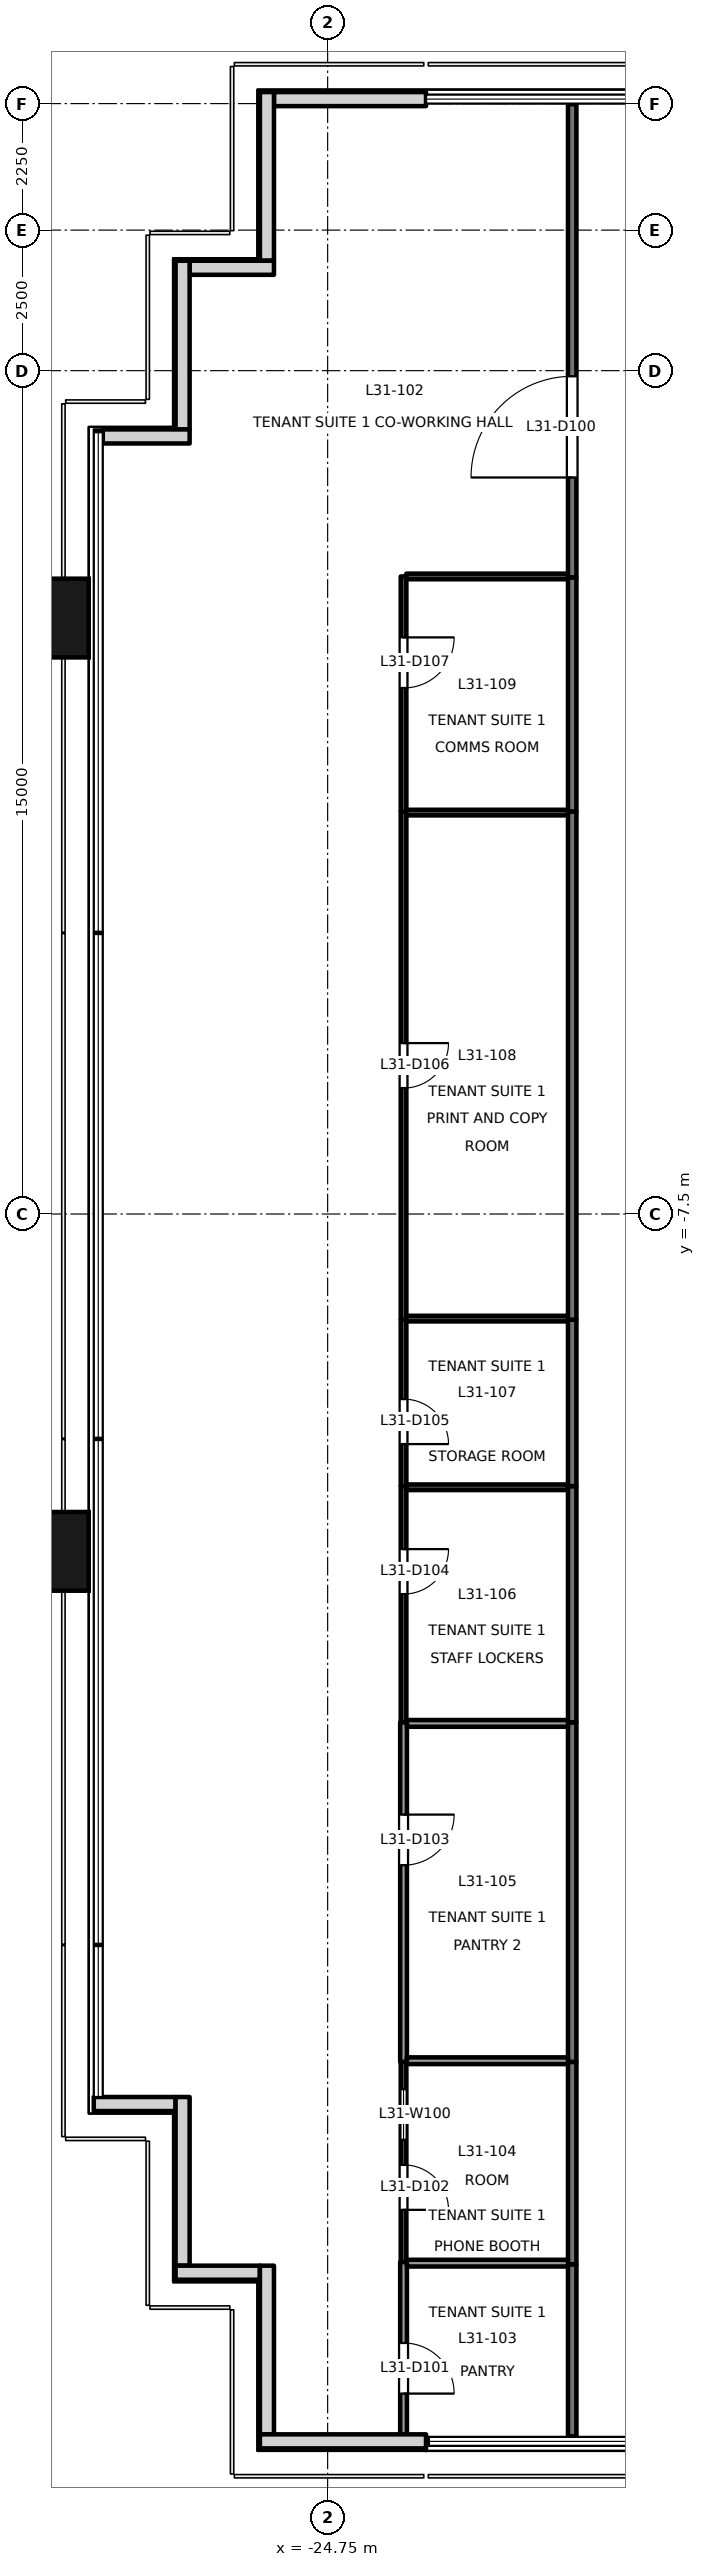
"""IFC4 building model, lengths in metres.
Left out: names, types, materials, properties, quantities, classifications, styles, units other than length and angle.
Written with IfcOpenShell. Run it as: python <this file> out.ifc"""

import sys

from ifc_helpers import new_model, si_unit, direction, frame, frame_2d, origin, origin_2d, place, context, subcontext, project, spatial, rectangle, extrude, element, fill, save


model = new_model("IFC4")
c1 = context("Model", 3, precision=1e-05, world=origin(), true_north=direction((0.0, 1.0)))
c2 = subcontext(c1, "Body", "Model", "MODEL_VIEW")
j1 = project(units=[si_unit("LENGTHUNIT", "METRE"), si_unit("PLANEANGLEUNIT", "RADIAN")], contexts=[c1])
p1 = place(None, origin())
s1 = spatial("IfcSite", under=j1, at=p1, CompositionType="ELEMENT")
p2 = place(p1, origin())
s2 = spatial("IfcBuilding", under=s1, at=p2, CompositionType="ELEMENT")
p3 = place(p2, frame((0.0, 0.0, 138.1)))
s3 = spatial("IfcBuildingStorey", under=s2, at=p3, CompositionType="ELEMENT", Elevation=138.1)
for number, where, z_axis, x_axis in (
    (1, (-29.9, -13.5, -0.2), (0.0, 0.0, 1.0), (0.0, 1.0, 0.0)),
    (2, (-29.9, 3.1, -0.2), (0.0, 0.0, 1.0), (0.0, 1.0, 0.0)),
):
    element("IfcColumn", number, at=place(p3, frame(where, z_axis=z_axis, x_axis=x_axis)), inside=s3, PredefinedType="COLUMN", context=c2, shape_type="SweptSolid", body=[
        extrude(rectangle(XDim=1.4, YDim=1.8, at=origin_2d()), origin(), (0.0, 0.0, 1.0), 4.0),
    ])
p4 = place(p3, frame((-23.0, 12.33, 0.0), z_axis=(0.0, 0.0, 1.0), x_axis=(-1.0, 0.0, 0.0)))
e3 = element("IfcWall", 3, at=p4, inside=s3, PredefinedType="SOLIDWALL", context=c2, shape_type="SweptSolid", body=[
    extrude(rectangle(XDim=2.705, YDim=0.25, at=frame_2d((1.353, 0.0))), origin(), (0.0, 0.0, 1.0), 3.8),
])
p5 = place(p3, frame((-25.83, 12.455, 0.0), z_axis=(0.0, 0.0, 1.0), x_axis=(0.0, -1.0, 0.0)))
e4 = element("IfcWall", 4, at=p5, inside=s3, PredefinedType="SOLIDWALL", context=c2, shape_type="SweptSolid", body=[
    extrude(rectangle(XDim=3.0, YDim=0.25, at=frame_2d((1.5, 0.0))), origin(), (0.0, 0.0, 1.0), 3.8),
])
p6 = place(p3, frame((-25.705, 9.33, 0.0), z_axis=(0.0, 0.0, 1.0), x_axis=(-1.0, 0.0, 0.0)))
e5 = element("IfcWall", 5, at=p6, inside=s3, PredefinedType="SOLIDWALL", context=c2, shape_type="SweptSolid", body=[
    extrude(rectangle(XDim=1.5, YDim=0.25, at=frame_2d((0.75, 0.0))), origin(), (0.0, 0.0, 1.0), 3.8),
])
p7 = place(p3, frame((-27.33, 9.455, 0.0), z_axis=(0.0, 0.0, 1.0), x_axis=(0.0, -1.0, 0.0)))
e6 = element("IfcWall", 6, at=p7, inside=s3, PredefinedType="SOLIDWALL", context=c2, shape_type="SweptSolid", body=[
    extrude(rectangle(XDim=3.0, YDim=0.25, at=frame_2d((1.5, 0.0))), origin(), (0.0, 0.0, 1.0), 3.8),
])
p8 = place(p3, frame((-27.205, 6.33, 0.0), z_axis=(0.0, 0.0, 1.0), x_axis=(-1.0, 0.0, 0.0)))
e7 = element("IfcWall", 7, at=p8, inside=s3, PredefinedType="SOLIDWALL", context=c2, shape_type="SweptSolid", body=[
    extrude(rectangle(XDim=1.545, YDim=0.25, at=frame_2d((0.772, 0.0))), origin(), (0.0, 0.0, 1.0), 3.8),
])
p9 = place(p3, frame((-28.91, -23.33, 0.0), z_axis=(0.0, 0.0, 1.0), x_axis=(1.0, 0.0, 0.0)))
e8 = element("IfcWall", 8, at=p9, inside=s3, PredefinedType="SOLIDWALL", context=c2, shape_type="SweptSolid", body=[
    extrude(rectangle(XDim=1.455, YDim=0.25, at=frame_2d((0.728, 0.0))), origin(), (0.0, 0.0, 1.0), 3.8),
])
p10 = place(p3, frame((-27.33, -23.205, 0.0), z_axis=(0.0, 0.0, 1.0), x_axis=(0.0, -1.0, 0.0)))
e9 = element("IfcWall", 9, at=p10, inside=s3, PredefinedType="SOLIDWALL", context=c2, shape_type="SweptSolid", body=[
    extrude(rectangle(XDim=3.0, YDim=0.25, at=frame_2d((1.5, 0.0))), origin(), (0.0, 0.0, 1.0), 3.8),
])
p11 = place(p3, frame((-27.455, -26.33, 0.0), z_axis=(0.0, 0.0, 1.0), x_axis=(1.0, 0.0, 0.0)))
e10 = element("IfcWall", 10, at=p11, inside=s3, PredefinedType="SOLIDWALL", context=c2, shape_type="SweptSolid", body=[
    extrude(rectangle(XDim=1.5, YDim=0.25, at=frame_2d((0.75, 0.0))), origin(), (0.0, 0.0, 1.0), 3.8),
])
p12 = place(p3, frame((-25.83, -26.205, 0.0), z_axis=(0.0, 0.0, 1.0), x_axis=(0.0, -1.0, 0.0)))
e11 = element("IfcWall", 11, at=p12, inside=s3, PredefinedType="SOLIDWALL", context=c2, shape_type="SweptSolid", body=[
    extrude(rectangle(XDim=3.0, YDim=0.25, at=frame_2d((1.5, 0.0))), origin(), (0.0, 0.0, 1.0), 3.8),
])
p13 = place(p3, frame((-25.955, -29.33, 0.0), z_axis=(0.0, 0.0, 1.0), x_axis=(1.0, 0.0, 0.0)))
e12 = element("IfcWall", 12, at=p13, inside=s3, PredefinedType="SOLIDWALL", context=c2, shape_type="SweptSolid", body=[
    extrude(rectangle(XDim=2.955, YDim=0.25, at=frame_2d((1.478, 0.0))), origin(), (0.0, 0.0, 1.0), 3.8),
])
p14 = place(p3, frame((-20.4, 3.82, 0.0), z_axis=(0.0, 0.0, 1.0), x_axis=(0.0, 1.0, 0.0)))
e13 = element("IfcWall", 13, at=p14, inside=s3, PredefinedType="PARTITIONING", context=c2, shape_type="SweptSolid", body=[
    extrude(rectangle(XDim=8.42, YDim=0.15, at=frame_2d((4.21, 0.0))), origin(), (0.0, 0.0, 1.0), 3.3),
])
p15 = place(p14, frame((1.78, 0.0, 0.0)))
e14 = element("IfcOpeningElement", 14, at=p15, cuts=e13, PredefinedType="OPENING", context=c2, shape_type="SweptSolid", body=[
    extrude(rectangle(XDim=1.8, YDim=2.1, at=frame_2d((0.9, 1.05))), frame((0.0, 0.085, 0.0), z_axis=(0.0, -1.0, 0.0), x_axis=(1.0, 0.0, 0.0)), (0.0, 0.0, 1.0), 0.171),
])
p16 = place(p3, frame((-20.4, -29.24, 0.0), z_axis=(0.0, 0.0, 1.0), x_axis=(0.0, 1.0, 0.0)))
e15 = element("IfcWall", 15, at=p16, inside=s3, PredefinedType="PARTITIONING", context=c2, shape_type="SweptSolid", body=[
    extrude(rectangle(XDim=3.06, YDim=0.15, at=frame_2d((1.53, 0.0))), origin(), (0.0, 0.0, 1.0), 3.8),
])
p17 = place(p3, frame((-20.4, -26.18, 0.0), z_axis=(0.0, 0.0, 1.0), x_axis=(0.0, 1.0, 0.0)))
e16 = element("IfcWall", 16, at=p17, inside=s3, PredefinedType="PARTITIONING", context=c2, shape_type="SweptSolid", body=[
    extrude(rectangle(XDim=3.6, YDim=0.15, at=frame_2d((1.8, 0.0))), origin(), (0.0, 0.0, 1.0), 3.8),
])
p18 = place(p3, frame((-20.4, -22.58, 0.0), z_axis=(0.0, 0.0, 1.0), x_axis=(0.0, 1.0, 0.0)))
e17 = element("IfcWall", 17, at=p18, inside=s3, PredefinedType="PARTITIONING", context=c2, shape_type="SweptSolid", body=[
    extrude(rectangle(XDim=6.04, YDim=0.15, at=frame_2d((3.02, 0.0))), origin(), (0.0, 0.0, 1.0), 3.8),
])
p19 = place(p3, frame((-20.4, -16.54, 0.0), z_axis=(0.0, 0.0, 1.0), x_axis=(0.0, 1.0, 0.0)))
e18 = element("IfcWall", 18, at=p19, inside=s3, PredefinedType="PARTITIONING", context=c2, shape_type="SweptSolid", body=[
    extrude(rectangle(XDim=4.2, YDim=0.15, at=frame_2d((2.1, 0.0))), origin(), (0.0, 0.0, 1.0), 3.8),
])
p20 = place(p3, frame((-20.4, -12.34, 0.0), z_axis=(0.0, 0.0, 1.0), x_axis=(0.0, 1.0, 0.0)))
e19 = element("IfcWall", 19, at=p20, inside=s3, PredefinedType="PARTITIONING", context=c2, shape_type="SweptSolid", body=[
    extrude(rectangle(XDim=2.96, YDim=0.15, at=frame_2d((1.48, 0.0))), origin(), (0.0, 0.0, 1.0), 3.8),
])
p21 = place(p3, frame((-20.4, -9.38, 0.0), z_axis=(0.0, 0.0, 1.0), x_axis=(0.0, 1.0, 0.0)))
e20 = element("IfcWall", 20, at=p21, inside=s3, PredefinedType="PARTITIONING", context=c2, shape_type="SweptSolid", body=[
    extrude(rectangle(XDim=9.04, YDim=0.15, at=frame_2d((4.52, 0.0))), origin(), (0.0, 0.0, 1.0), 3.3),
])
p22 = place(p3, frame((-20.4, -0.34, 0.0), z_axis=(0.0, 0.0, 1.0), x_axis=(0.0, 1.0, 0.0)))
e21 = element("IfcWall", 21, at=p22, inside=s3, PredefinedType="PARTITIONING", context=c2, shape_type="SweptSolid", body=[
    extrude(rectangle(XDim=4.16, YDim=0.15, at=frame_2d((2.08, 0.0))), origin(), (0.0, 0.0, 1.0), 3.3),
])
p23 = place(p3, frame((-23.4, -26.14, 0.0), z_axis=(0.0, 0.0, 1.0), x_axis=(0.0, -1.0, 0.0)))
e22 = element("IfcWall", 22, at=p23, inside=s3, PredefinedType="PARTITIONING", context=c2, shape_type="SweptSolid", body=[
    extrude(rectangle(XDim=3.1, YDim=0.12, at=frame_2d((1.55, 0.0))), origin(), (0.0, 0.0, 1.0), 3.8),
])
p24 = place(p23, frame((1.44, 0.0, 0.0)))
e23 = element("IfcOpeningElement", 23, at=p24, cuts=e22, PredefinedType="OPENING", context=c2, shape_type="SweptSolid", body=[
    extrude(rectangle(XDim=0.9, YDim=2.1, at=frame_2d((0.45, 1.05))), frame((0.0, 0.071, 0.0), z_axis=(0.0, -1.0, 0.0), x_axis=(1.0, 0.0, 0.0)), (0.0, 0.0, 1.0), 0.141),
])
p25 = place(p3, frame((-23.4, -22.58, 0.0), z_axis=(0.0, 0.0, 1.0), x_axis=(0.0, -1.0, 0.0)))
e24 = element("IfcWall", 24, at=p25, inside=s3, PredefinedType="PARTITIONING", context=c2, shape_type="SweptSolid", body=[
    extrude(rectangle(XDim=3.56, YDim=0.1, at=frame_2d((1.78, 0.0))), origin(), (0.0, 0.0, 1.0), 3.8),
])
p26 = place(p25, frame((1.832, 0.0, 0.0)))
e25 = element("IfcOpeningElement", 25, at=p26, cuts=e24, PredefinedType="OPENING", context=c2, shape_type="SweptSolid", body=[
    extrude(rectangle(XDim=0.8, YDim=2.1, at=frame_2d((0.4, 1.05))), frame((0.0, 0.061, 0.0), z_axis=(0.0, -1.0, 0.0), x_axis=(1.0, 0.0, 0.0)), (0.0, 0.0, 1.0), 0.121),
])
p27 = place(p25, frame((0.486, 0.0, 0.9)))
e26 = element("IfcOpeningElement", 26, at=p27, cuts=e24, PredefinedType="OPENING", context=c2, shape_type="SweptSolid", body=[
    extrude(rectangle(XDim=0.9, YDim=1.2, at=frame_2d((0.45, 0.6))), frame((0.0, 0.061, 0.0), z_axis=(0.0, -1.0, 0.0), x_axis=(1.0, 0.0, 0.0)), (0.0, 0.0, 1.0), 0.121),
])
p28 = place(p3, frame((-23.4, -16.54, 0.0), z_axis=(0.0, 0.0, 1.0), x_axis=(0.0, -1.0, 0.0)))
e27 = element("IfcWall", 27, at=p28, inside=s3, PredefinedType="PARTITIONING", context=c2, shape_type="SweptSolid", body=[
    extrude(rectangle(XDim=6.04, YDim=0.12, at=frame_2d((3.02, 0.0))), origin(), (0.0, 0.0, 1.0), 3.8),
])
p29 = place(p28, frame((1.642, 0.0, 0.0)))
e28 = element("IfcOpeningElement", 28, at=p29, cuts=e27, PredefinedType="OPENING", context=c2, shape_type="SweptSolid", body=[
    extrude(rectangle(XDim=0.9, YDim=2.1, at=frame_2d((0.45, 1.05))), frame((0.0, 0.071, 0.0), z_axis=(0.0, -1.0, 0.0), x_axis=(1.0, 0.0, 0.0)), (0.0, 0.0, 1.0), 0.141),
])
p30 = place(p3, frame((-23.4, -12.34, 0.0), z_axis=(0.0, 0.0, 1.0), x_axis=(0.0, -1.0, 0.0)))
e29 = element("IfcWall", 29, at=p30, inside=s3, PredefinedType="PARTITIONING", context=c2, shape_type="SweptSolid", body=[
    extrude(rectangle(XDim=4.2, YDim=0.1, at=frame_2d((2.1, 0.0))), origin(), (0.0, 0.0, 1.0), 3.8),
])
p31 = place(p30, frame((1.12, 0.0, 0.0)))
e30 = element("IfcOpeningElement", 30, at=p31, cuts=e29, PredefinedType="OPENING", context=c2, shape_type="SweptSolid", body=[
    extrude(rectangle(XDim=0.8, YDim=2.1, at=frame_2d((0.4, 1.05))), frame((0.0, 0.061, 0.0), z_axis=(0.0, -1.0, 0.0), x_axis=(1.0, 0.0, 0.0)), (0.0, 0.0, 1.0), 0.121),
])
p32 = place(p3, frame((-23.4, -9.38, 0.0), z_axis=(0.0, 0.0, 1.0), x_axis=(0.0, -1.0, 0.0)))
e31 = element("IfcWall", 31, at=p32, inside=s3, PredefinedType="PARTITIONING", context=c2, shape_type="SweptSolid", body=[
    extrude(rectangle(XDim=2.96, YDim=0.1, at=frame_2d((1.48, 0.0))), origin(), (0.0, 0.0, 1.0), 3.8),
])
p33 = place(p32, frame((1.412, 0.0, 0.0)))
e32 = element("IfcOpeningElement", 32, at=p33, cuts=e31, PredefinedType="OPENING", context=c2, shape_type="SweptSolid", body=[
    extrude(rectangle(XDim=0.8, YDim=2.1, at=frame_2d((0.4, 1.05))), frame((0.0, 0.061, 0.0), z_axis=(0.0, -1.0, 0.0), x_axis=(1.0, 0.0, 0.0)), (0.0, 0.0, 1.0), 0.121),
])
p34 = place(p3, frame((-23.4, -0.34, 0.0), z_axis=(0.0, 0.0, 1.0), x_axis=(0.0, -1.0, 0.0)))
e33 = element("IfcWall", 33, at=p34, inside=s3, PredefinedType="PARTITIONING", context=c2, shape_type="SweptSolid", body=[
    extrude(rectangle(XDim=9.04, YDim=0.1, at=frame_2d((4.52, 0.0))), origin(), (0.0, 0.0, 1.0), 3.3),
])
p35 = place(p34, frame((4.12, 0.0, 0.0)))
e34 = element("IfcOpeningElement", 34, at=p35, cuts=e33, PredefinedType="OPENING", context=c2, shape_type="SweptSolid", body=[
    extrude(rectangle(XDim=0.8, YDim=2.1, at=frame_2d((0.4, 1.05))), frame((0.0, 0.061, 0.0), z_axis=(0.0, -1.0, 0.0), x_axis=(1.0, 0.0, 0.0)), (0.0, 0.0, 1.0), 0.121),
])
p36 = place(p3, frame((-23.4, 3.84, 0.0), z_axis=(0.0, 0.0, 1.0), x_axis=(0.0, -1.0, 0.0)))
e35 = element("IfcWall", 35, at=p36, inside=s3, PredefinedType="PARTITIONING", context=c2, shape_type="SweptSolid", body=[
    extrude(rectangle(XDim=4.18, YDim=0.1, at=frame_2d((2.09, 0.0))), origin(), (0.0, 0.0, 1.0), 3.3),
])
p37 = place(p36, frame((1.084, 0.0, 0.0)))
e36 = element("IfcOpeningElement", 36, at=p37, cuts=e35, PredefinedType="OPENING", context=c2, shape_type="SweptSolid", body=[
    extrude(rectangle(XDim=0.9, YDim=2.1, at=frame_2d((0.45, 1.05))), frame((0.0, 0.061, 0.0), z_axis=(0.0, -1.0, 0.0), x_axis=(1.0, 0.0, 0.0)), (0.0, 0.0, 1.0), 0.121),
])
p38 = place(p3, frame((-20.475, 3.84, 0.0), z_axis=(0.0, 0.0, 1.0), x_axis=(-1.0, 0.0, 0.0)))
e37 = element("IfcWall", 37, at=p38, inside=s3, PredefinedType="PARTITIONING", context=c2, shape_type="SweptSolid", body=[
    extrude(rectangle(XDim=2.875, YDim=0.1, at=frame_2d((1.438, 0.0))), origin(), (0.0, 0.0, 1.0), 3.8),
])
for number, where, z_axis, x_axis in (
    (38, (-23.34, -26.16, 0.0), (0.0, 0.0, 1.0), (1.0, 0.0, 0.0)),
    (39, (-23.34, -22.56, 0.0), (0.0, 0.0, 1.0), (1.0, 0.0, 0.0)),
    (40, (-23.34, -16.56, 0.0), (0.0, 0.0, 1.0), (1.0, 0.0, 0.0)),
):
    element("IfcWall", number, at=place(p3, frame(where, z_axis=z_axis, x_axis=x_axis)), inside=s3, PredefinedType="PARTITIONING", context=c2, shape_type="SweptSolid", body=[
        extrude(rectangle(XDim=2.865, YDim=0.12, at=frame_2d((1.433, 0.0))), origin(), (0.0, 0.0, 1.0), 3.8),
    ])
for number, where, z_axis, x_axis in (
    (41, (-23.35, -12.36, 0.0), (0.0, 0.0, 1.0), (1.0, 0.0, 0.0)),
    (42, (-23.35, -9.36, 0.0), (0.0, 0.0, 1.0), (1.0, 0.0, 0.0)),
    (43, (-23.35, -0.36, 0.0), (0.0, 0.0, 1.0), (1.0, 0.0, 0.0)),
):
    element("IfcWall", number, at=place(p3, frame(where, z_axis=z_axis, x_axis=x_axis)), inside=s3, PredefinedType="PARTITIONING", context=c2, shape_type="SweptSolid", body=[
        extrude(rectangle(XDim=2.875, YDim=0.1, at=frame_2d((1.438, 0.0))), origin(), (0.0, 0.0, 1.0), 3.8),
    ])
p39 = place(p15, origin())
e44 = element("IfcDoor", 44, at=p39, inside=s3, OperationType="DOUBLE_DOOR_SINGLE_SWING", PredefinedType="DOOR", context=c2, shape_type="SweptSolid", body=[
    extrude(rectangle(XDim=1.8, YDim=2.1, at=frame_2d((0.9, 1.05))), frame((0.0, 0.025, 0.0), z_axis=(0.0, -1.0, 0.0), x_axis=(1.0, 0.0, 0.0)), (0.0, 0.0, 1.0), 0.05),
])
fill(e14, e44)
p40 = place(p24, origin())
e45 = element("IfcDoor", 45, at=p40, inside=s3, OperationType="SINGLE_SWING_RIGHT", PredefinedType="DOOR", context=c2, shape_type="SweptSolid", body=[
    extrude(rectangle(XDim=0.9, YDim=2.1, at=frame_2d((0.45, 1.05))), frame((0.0, 0.025, 0.0), z_axis=(0.0, -1.0, 0.0), x_axis=(1.0, 0.0, 0.0)), (0.0, 0.0, 1.0), 0.05),
])
fill(e23, e45)
p41 = place(p26, origin())
e46 = element("IfcDoor", 46, at=p41, inside=s3, OperationType="SINGLE_SWING_RIGHT", PredefinedType="DOOR", context=c2, shape_type="SweptSolid", body=[
    extrude(rectangle(XDim=0.8, YDim=2.1, at=frame_2d((0.4, 1.05))), frame((0.0, 0.025, 0.0), z_axis=(0.0, -1.0, 0.0), x_axis=(1.0, 0.0, 0.0)), (0.0, 0.0, 1.0), 0.05),
])
fill(e25, e46)
p42 = place(p29, origin())
e47 = element("IfcDoor", 47, at=p42, inside=s3, OperationType="SINGLE_SWING_LEFT", PredefinedType="DOOR", context=c2, shape_type="SweptSolid", body=[
    extrude(rectangle(XDim=0.9, YDim=2.1, at=frame_2d((0.45, 1.05))), frame((0.0, 0.025, 0.0), z_axis=(0.0, -1.0, 0.0), x_axis=(1.0, 0.0, 0.0)), (0.0, 0.0, 1.0), 0.05),
])
fill(e28, e47)
p43 = place(p31, origin())
e48 = element("IfcDoor", 48, at=p43, inside=s3, OperationType="SINGLE_SWING_LEFT", PredefinedType="DOOR", context=c2, shape_type="SweptSolid", body=[
    extrude(rectangle(XDim=0.8, YDim=2.1, at=frame_2d((0.4, 1.05))), frame((0.0, 0.025, 0.0), z_axis=(0.0, -1.0, 0.0), x_axis=(1.0, 0.0, 0.0)), (0.0, 0.0, 1.0), 0.05),
])
fill(e30, e48)
p44 = place(p33, origin())
e49 = element("IfcDoor", 49, at=p44, inside=s3, OperationType="SINGLE_SWING_RIGHT", PredefinedType="DOOR", context=c2, shape_type="SweptSolid", body=[
    extrude(rectangle(XDim=0.8, YDim=2.1, at=frame_2d((0.4, 1.05))), frame((0.0, 0.025, 0.0), z_axis=(0.0, -1.0, 0.0), x_axis=(1.0, 0.0, 0.0)), (0.0, 0.0, 1.0), 0.05),
])
fill(e32, e49)
p45 = place(p35, origin())
e50 = element("IfcDoor", 50, at=p45, inside=s3, OperationType="SINGLE_SWING_LEFT", PredefinedType="DOOR", context=c2, shape_type="SweptSolid", body=[
    extrude(rectangle(XDim=0.8, YDim=2.1, at=frame_2d((0.4, 1.05))), frame((0.0, 0.025, 0.0), z_axis=(0.0, -1.0, 0.0), x_axis=(1.0, 0.0, 0.0)), (0.0, 0.0, 1.0), 0.05),
])
fill(e34, e50)
p46 = place(p37, origin())
e51 = element("IfcDoor", 51, at=p46, inside=s3, OperationType="SINGLE_SWING_LEFT", PredefinedType="DOOR", context=c2, shape_type="SweptSolid", body=[
    extrude(rectangle(XDim=0.9, YDim=2.1, at=frame_2d((0.45, 1.05))), frame((0.0, 0.025, 0.0), z_axis=(0.0, -1.0, 0.0), x_axis=(1.0, 0.0, 0.0)), (0.0, 0.0, 1.0), 0.05),
])
fill(e36, e51)
p47 = place(p27, origin())
e52 = element("IfcWindow", 52, at=p47, inside=s3, PartitioningType="SINGLE_PANEL", PredefinedType="WINDOW", context=c2, shape_type="SweptSolid", body=[
    extrude(rectangle(XDim=0.9, YDim=1.2, at=frame_2d((0.45, 0.6))), frame((0.0, 0.03, 0.0), z_axis=(0.0, -1.0, 0.0), x_axis=(1.0, 0.0, 0.0)), (0.0, 0.0, 1.0), 0.06),
])
fill(e26, e52)
save(model, sys.argv[1])
